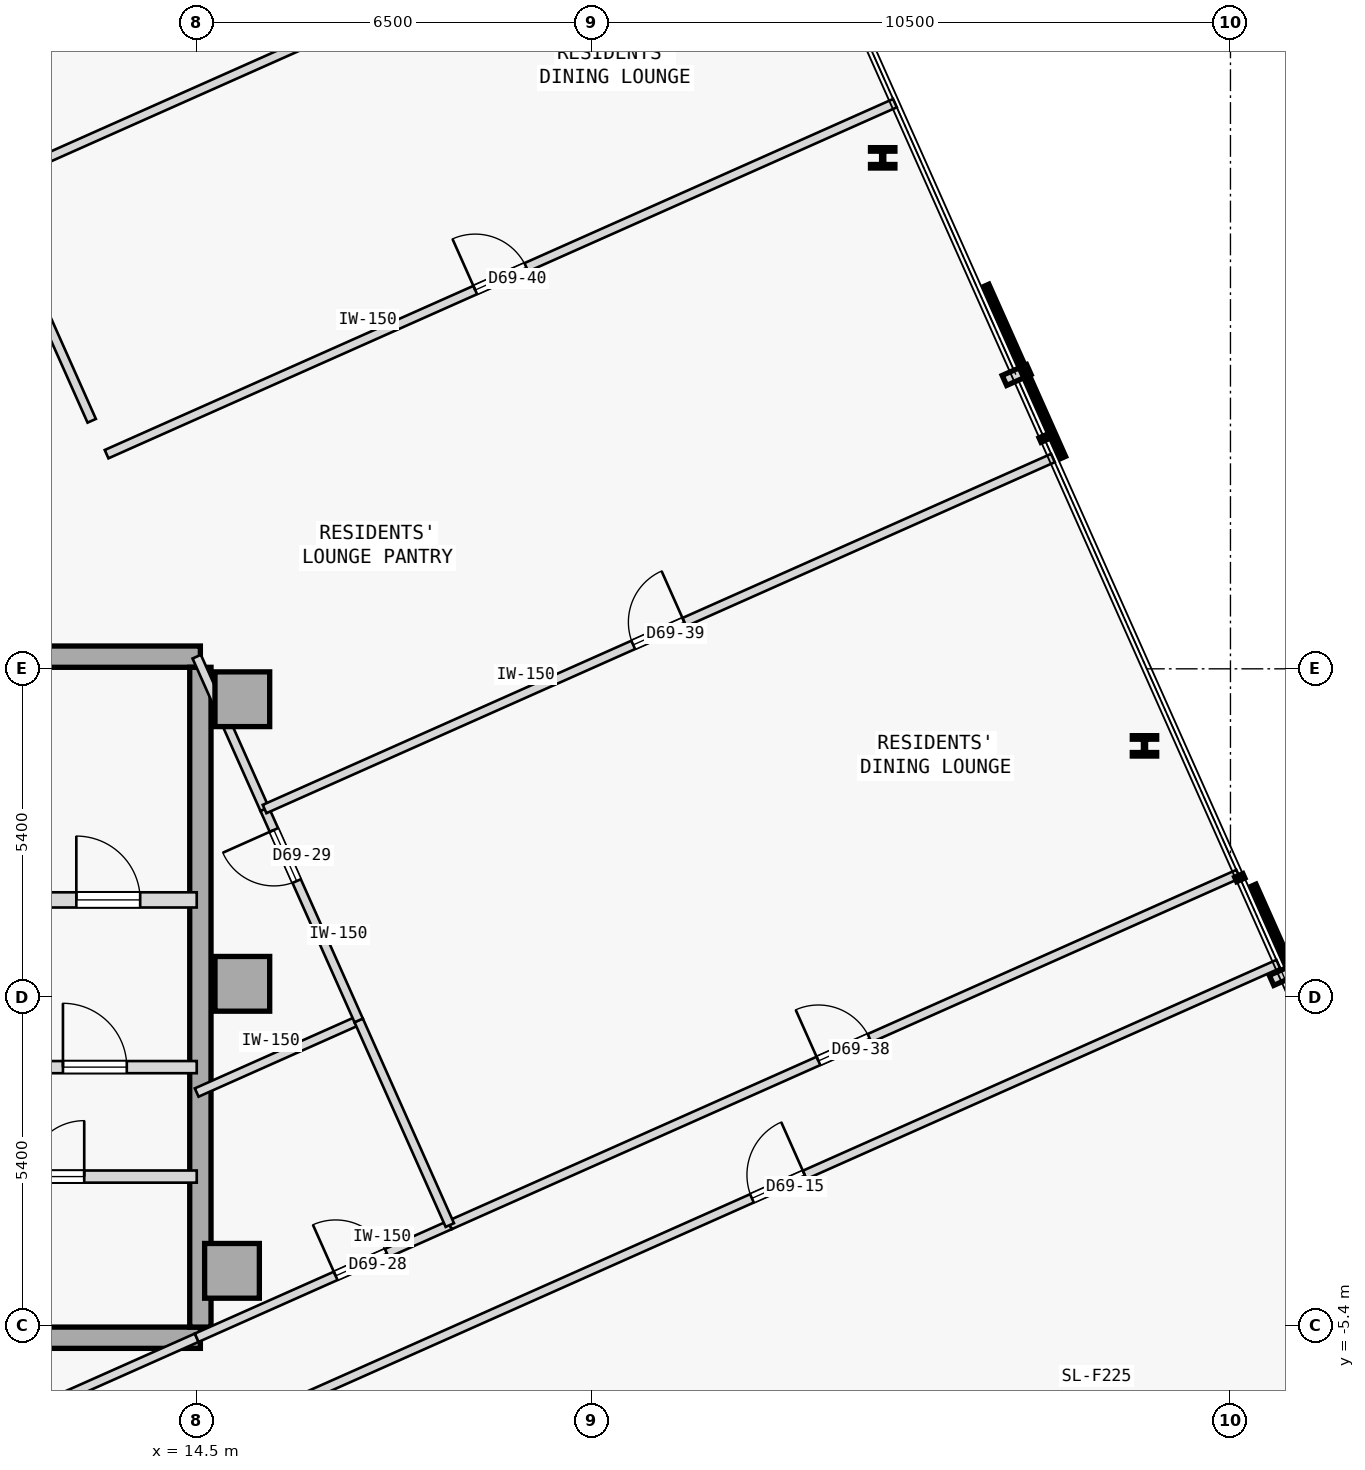
"""IFC4 building model, lengths in metres.
Left out: names, types, materials, properties, quantities, classifications, styles, units other than length and angle.
Written with IfcOpenShell. Run it as: python <this file> out.ifc"""

import sys

from ifc_helpers import new_model, si_unit, direction, frame, frame_2d, origin, origin_2d, place, context, subcontext, project, spatial, rectangle, i_section, extrude, element, fill, save


model = new_model("IFC4")
c1 = context("Model", 3, precision=1e-05, world=origin(), true_north=direction((0.0, 1.0)))
c2 = subcontext(c1, "Body", "Model", "MODEL_VIEW")
j1 = project(units=[si_unit("LENGTHUNIT", "METRE"), si_unit("PLANEANGLEUNIT", "RADIAN")], contexts=[c1])
p1 = place(None, origin())
s1 = spatial("IfcSite", under=j1, at=p1, CompositionType="ELEMENT")
p2 = place(p1, origin())
s2 = spatial("IfcBuilding", under=s1, at=p2, CompositionType="ELEMENT")
p3 = place(p2, frame((0.0, 0.0, 258.85)))
s3 = spatial("IfcBuildingStorey", under=s2, at=p3, CompositionType="ELEMENT", Elevation=258.85)
for number, where, z_axis, x_axis in (
    (1, (15.25, 4.9, 0.0), (0.0, 0.0, 1.0), (1.0, 0.0, 0.0)),
    (2, (15.25, 0.22, 0.0), (0.0, 0.0, 1.0), (1.0, 0.0, 0.0)),
    (3, (15.08, -4.5, 0.0), (0.0, 0.0, 1.0), (1.0, 0.0, 0.0)),
):
    element("IfcColumn", number, at=place(p3, frame(where, z_axis=z_axis, x_axis=x_axis)), inside=s3, PredefinedType="COLUMN", context=c2, shape_type="SweptSolid", body=[
        extrude(rectangle(XDim=0.9, YDim=0.9, at=origin_2d()), origin(), (0.0, 0.0, 1.0), 3.35),
    ])
p4 = place(p3, frame((3.15, 5.6, 0.0), z_axis=(0.0, 0.0, 1.0), x_axis=(1.0, 0.0, 0.0)))
e4 = element("IfcWall", 4, at=p4, inside=s3, PredefinedType="SHEAR", context=c2, shape_type="SweptSolid", body=[
    extrude(rectangle(XDim=11.41, YDim=0.35, at=frame_2d((5.705, 0.0))), origin(), (0.0, 0.0, 1.0), 3.125),
])
p5 = place(p3, frame((3.7, -5.6, 0.0), z_axis=(0.0, 0.0, 1.0), x_axis=(1.0, 0.0, 0.0)))
e5 = element("IfcWall", 5, at=p5, inside=s3, PredefinedType="SHEAR", context=c2, shape_type="SweptSolid", body=[
    extrude(rectangle(XDim=10.86, YDim=0.35, at=frame_2d((5.43, 0.0))), origin(), (0.0, 0.0, 1.0), 3.125),
])
p6 = place(p3, frame((14.56, -5.425, 0.0), z_axis=(0.0, 0.0, 1.0), x_axis=(0.0, 1.0, 0.0)))
e6 = element("IfcWall", 6, at=p6, inside=s3, PredefinedType="SHEAR", context=c2, shape_type="SweptSolid", body=[
    extrude(rectangle(XDim=10.85, YDim=0.35, at=frame_2d((5.425, 0.0))), origin(), (0.0, 0.0, 1.0), 3.125),
])
for number, where, z_axis, x_axis in (
    (7, (30.086, 4.133, 0.0), (0.0, 0.0, 1.0), (1.0, 0.0, 0.0)),
    (8, (25.781, 13.803, 0.0), (0.0, 0.0, 1.0), (1.0, 0.0, 0.0)),
):
    element("IfcColumn", number, at=place(p3, frame(where, z_axis=z_axis, x_axis=x_axis)), inside=s3, PredefinedType="COLUMN", context=c2, shape_type="SweptSolid", body=[
        extrude(i_section(OverallWidth=0.401, OverallDepth=0.335, WebThickness=0.036, FlangeThickness=0.058, FilletRadius=0.015, at=origin_2d()), origin(), (0.0, 0.0, 1.0), 3.35),
    ])
p7 = place(p3, frame((10.9, 1.6, 0.0), z_axis=(0.0, 0.0, 1.0), x_axis=(1.0, 0.0, 0.0)))
e9 = element("IfcWall", 9, at=p7, inside=s3, PredefinedType="STANDARD", context=c2, shape_type="SweptSolid", body=[
    extrude(rectangle(XDim=3.6, YDim=0.25, at=frame_2d((1.8, 0.0))), origin(), (0.0, 0.0, 1.0), 3.125),
])
p8 = place(p7, frame((1.62, 0.0, 0.0)))
e10 = element("IfcOpeningElement", 10, at=p8, cuts=e9, PredefinedType="OPENING", context=c2, shape_type="SweptSolid", body=[
    extrude(rectangle(XDim=1.05, YDim=2.15, at=frame_2d((0.525, 1.075))), frame((0.0, 0.135, 0.0), z_axis=(0.0, -1.0, 0.0), x_axis=(1.0, 0.0, 0.0)), (0.0, 0.0, 1.0), 0.27),
])
p9 = place(p3, frame((11.55, -1.15, 0.0), z_axis=(0.0, 0.0, 1.0), x_axis=(1.0, 0.0, 0.0)))
e11 = element("IfcWall", 11, at=p9, inside=s3, PredefinedType="STANDARD", context=c2, shape_type="SweptSolid", body=[
    extrude(rectangle(XDim=2.95, YDim=0.2, at=frame_2d((1.475, 0.0))), origin(), (0.0, 0.0, 1.0), 3.125),
])
p10 = place(p9, frame((0.75, 0.0, 0.0)))
e12 = element("IfcOpeningElement", 12, at=p10, cuts=e11, PredefinedType="OPENING", context=c2, shape_type="SweptSolid", body=[
    extrude(rectangle(XDim=1.05, YDim=2.18, at=frame_2d((0.525, 1.09))), frame((0.0, 0.11, 0.0), z_axis=(0.0, -1.0, 0.0), x_axis=(1.0, 0.0, 0.0)), (0.0, 0.0, 1.0), 0.22),
])
p11 = place(p3, frame((3.7, -2.95, 0.0), z_axis=(0.0, 0.0, 1.0), x_axis=(1.0, 0.0, 0.0)))
e13 = element("IfcWall", 13, at=p11, inside=s3, PredefinedType="STANDARD", context=c2, shape_type="SweptSolid", body=[
    extrude(rectangle(XDim=10.8, YDim=0.2, at=frame_2d((5.4, 0.0))), origin(), (0.0, 0.0, 1.0), 3.125),
])
p12 = place(p11, frame((0.53, 0.0, 0.0)))
e14 = element("IfcOpeningElement", 14, at=p12, cuts=e13, PredefinedType="OPENING", context=c2, shape_type="SweptSolid", body=[
    extrude(rectangle(XDim=1.1, YDim=2.15, at=frame_2d((0.55, 1.075))), frame((0.0, 0.11, 0.0), z_axis=(0.0, -1.0, 0.0), x_axis=(1.0, 0.0, 0.0)), (0.0, 0.0, 1.0), 0.22),
])
p13 = place(p11, frame((3.71, 0.0, 0.0)))
e15 = element("IfcOpeningElement", 15, at=p13, cuts=e13, PredefinedType="OPENING", context=c2, shape_type="SweptSolid", body=[
    extrude(rectangle(XDim=0.92, YDim=2.15, at=frame_2d((0.46, 1.075))), frame((0.0, 0.11, 0.0), z_axis=(0.0, -1.0, 0.0), x_axis=(1.0, 0.0, 0.0)), (0.0, 0.0, 1.0), 0.22),
])
p14 = place(p11, frame((8.03, 0.0, 0.0)))
e16 = element("IfcOpeningElement", 16, at=p14, cuts=e13, PredefinedType="OPENING", context=c2, shape_type="SweptSolid", body=[
    extrude(rectangle(XDim=0.92, YDim=2.15, at=frame_2d((0.46, 1.075))), frame((0.0, 0.11, 0.0), z_axis=(0.0, -1.0, 0.0), x_axis=(1.0, 0.0, 0.0)), (0.0, 0.0, 1.0), 0.22),
])
p15 = place(p3, frame((15.843, -6.776, 0.0), z_axis=(0.0, 0.0, 1.0), x_axis=(0.913541183414, 0.406746243015, 0.0)))
e17 = element("IfcWall", 17, at=p15, inside=s3, PredefinedType="PARTITIONING", context=c2, shape_type="SweptSolid", body=[
    extrude(rectangle(XDim=17.999, YDim=0.15, at=frame_2d((9.0, 0.0))), origin(), (0.0, 0.0, 1.0), 3.125),
])
p16 = place(p15, frame((8.524, 0.0, 0.0)))
e18 = element("IfcOpeningElement", 18, at=p16, cuts=e17, PredefinedType="OPENING", context=c2, shape_type="SweptSolid", body=[
    extrude(rectangle(XDim=0.95, YDim=2.15, at=frame_2d((0.475, 1.075))), frame((0.0, 0.085, 0.0), z_axis=(0.0, -1.0, 0.0), x_axis=(1.0, 0.0, 0.0)), (0.0, 0.0, 1.0), 0.17),
])
p17 = place(p3, frame((7.588, -8.677, 0.0), z_axis=(0.0, 0.0, 1.0), x_axis=(0.913555880467, 0.406713232221, 0.0)))
e19 = element("IfcWall", 19, at=p17, inside=s3, PredefinedType="PARTITIONING", context=c2, shape_type="SweptSolid", body=[
    extrude(rectangle(XDim=7.566, YDim=0.15, at=frame_2d((3.783, 0.0))), origin(), (0.0, 0.0, 1.0), 3.125),
])
p18 = place(p17, frame((1.205, 0.0, 0.0)))
e20 = element("IfcOpeningElement", 20, at=p18, cuts=e19, PredefinedType="OPENING", context=c2, shape_type="SweptSolid", body=[
    extrude(rectangle(XDim=0.92, YDim=2.15, at=frame_2d((0.46, 1.075))), frame((0.0, 0.085, 0.0), z_axis=(0.0, -1.0, 0.0), x_axis=(1.0, 0.0, 0.0)), (0.0, 0.0, 1.0), 0.17),
])
p19 = place(p3, frame((14.5, -5.6, 0.0), z_axis=(0.0, 0.0, 1.0), x_axis=(0.913550607208, 0.406725076766, 0.0)))
e21 = element("IfcWall", 21, at=p19, inside=s3, PredefinedType="PARTITIONING", context=c2, shape_type="SweptSolid", body=[
    extrude(rectangle(XDim=4.556, YDim=0.15, at=frame_2d((2.278, 0.0))), origin(), (0.0, 0.0, 1.0), 3.125),
])
p20 = place(p19, frame((2.501, 0.0, 0.0)))
e22 = element("IfcOpeningElement", 22, at=p20, cuts=e21, PredefinedType="OPENING", context=c2, shape_type="SweptSolid", body=[
    extrude(rectangle(XDim=0.92, YDim=2.15, at=frame_2d((0.46, 1.075))), frame((0.0, 0.085, 0.0), z_axis=(0.0, -1.0, 0.0), x_axis=(1.0, 0.0, 0.0)), (0.0, 0.0, 1.0), 0.17),
])
p21 = place(p3, frame((18.662, -3.747, 0.0), z_axis=(0.0, 0.0, 1.0), x_axis=(0.913544622417, 0.406738519018, 0.0)))
e23 = element("IfcWall", 23, at=p21, inside=s3, PredefinedType="PARTITIONING", context=c2, shape_type="SweptSolid", body=[
    extrude(rectangle(XDim=14.192, YDim=0.15, at=frame_2d((7.096, 0.0))), origin(), (0.0, 0.0, 1.0), 3.125),
])
p22 = place(p21, frame((6.636, 0.0, 0.0)))
e24 = element("IfcOpeningElement", 24, at=p22, cuts=e23, PredefinedType="OPENING", context=c2, shape_type="SweptSolid", body=[
    extrude(rectangle(XDim=0.92, YDim=2.15, at=frame_2d((0.46, 1.075))), frame((0.0, 0.085, 0.0), z_axis=(0.0, -1.0, 0.0), x_axis=(1.0, 0.0, 0.0)), (0.0, 0.0, 1.0), 0.17),
])
p23 = place(p3, frame((14.5, -1.568, 0.0), z_axis=(0.0, 0.0, 1.0), x_axis=(0.91354204122, 0.4067443164, 0.0)))
e25 = element("IfcWall", 25, at=p23, inside=s3, PredefinedType="PARTITIONING", context=c2, shape_type="SweptSolid", body=[
    extrude(rectangle(XDim=2.916, YDim=0.15, at=frame_2d((1.458, 0.0))), origin(), (0.0, 0.0, 1.0), 3.125),
])
p24 = place(p3, frame((18.662, -3.747, 0.0), z_axis=(0.0, 0.0, 1.0), x_axis=(-0.406740920471, 0.913543553212, 0.0)))
e26 = element("IfcWall", 26, at=p24, inside=s3, PredefinedType="PARTITIONING", context=c2, shape_type="SweptSolid", body=[
    extrude(rectangle(XDim=3.684, YDim=0.15, at=frame_2d((1.842, 0.0))), origin(), (0.0, 0.0, 1.0), 3.125),
])
p25 = place(p3, frame((17.163, -0.382, 0.0), z_axis=(0.0, 0.0, 1.0), x_axis=(-0.406727752939, 0.913549415735, 0.0)))
e27 = element("IfcWall", 27, at=p25, inside=s3, PredefinedType="PARTITIONING", context=c2, shape_type="SweptSolid", body=[
    extrude(rectangle(XDim=3.805, YDim=0.15, at=frame_2d((1.902, 0.0))), origin(), (0.0, 0.0, 1.0), 3.125),
])
p26 = place(p25, frame((2.508, 0.0, 0.0)))
e28 = element("IfcOpeningElement", 28, at=p26, cuts=e27, PredefinedType="OPENING", context=c2, shape_type="SweptSolid", body=[
    extrude(rectangle(XDim=0.92, YDim=2.15, at=frame_2d((0.46, 1.075))), frame((0.0, 0.085, 0.0), z_axis=(0.0, -1.0, 0.0), x_axis=(1.0, 0.0, 0.0)), (0.0, 0.0, 1.0), 0.17),
])
p27 = place(p3, frame((15.616, 3.094, 0.0), z_axis=(0.0, 0.0, 1.0), x_axis=(-0.406782551453, 0.913525016534, 0.0)))
e29 = element("IfcWall", 29, at=p27, inside=s3, PredefinedType="PARTITIONING", context=c2, shape_type="SweptSolid", body=[
    extrude(rectangle(XDim=2.743, YDim=0.15, at=frame_2d((1.372, 0.0))), origin(), (0.0, 0.0, 1.0), 3.125),
])
p28 = place(p3, frame((12.773, 9.479, 0.0), z_axis=(0.0, 0.0, 1.0), x_axis=(-0.406762672331, 0.913533868227, 0.0)))
e30 = element("IfcWall", 30, at=p28, inside=s3, PredefinedType="PARTITIONING", context=c2, shape_type="SweptSolid", body=[
    extrude(rectangle(XDim=4.245, YDim=0.15, at=frame_2d((2.123, 0.0))), origin(), (0.0, 0.0, 1.0), 3.125),
])
p29 = place(p3, frame((15.616, 3.094, 0.0), z_axis=(0.0, 0.0, 1.0), x_axis=(0.913551014388, 0.406724162191, 0.0)))
e31 = element("IfcWall", 31, at=p29, inside=s3, PredefinedType="PARTITIONING", context=c2, shape_type="SweptSolid", body=[
    extrude(rectangle(XDim=14.192, YDim=0.15, at=frame_2d((7.096, 0.0))), origin(), (0.0, 0.0, 1.0), 3.125),
])
p30 = place(p29, frame((6.636, 0.0, 0.0)))
e32 = element("IfcOpeningElement", 32, at=p30, cuts=e31, PredefinedType="OPENING", context=c2, shape_type="SweptSolid", body=[
    extrude(rectangle(XDim=0.92, YDim=2.15, at=frame_2d((0.46, 1.075))), frame((0.0, 0.085, 0.0), z_axis=(0.0, -1.0, 0.0), x_axis=(1.0, 0.0, 0.0)), (0.0, 0.0, 1.0), 0.17),
])
p31 = place(p3, frame((13.018, 8.93, 0.0), z_axis=(0.0, 0.0, 1.0), x_axis=(0.913551014388, 0.406724162191, 0.0)))
e33 = element("IfcWall", 33, at=p31, inside=s3, PredefinedType="PARTITIONING", context=c2, shape_type="SweptSolid", body=[
    extrude(rectangle(XDim=14.192, YDim=0.15, at=frame_2d((7.096, 0.0))), origin(), (0.0, 0.0, 1.0), 3.125),
])
p32 = place(p31, frame((6.636, 0.0, 0.0)))
e34 = element("IfcOpeningElement", 34, at=p32, cuts=e33, PredefinedType="OPENING", context=c2, shape_type="SweptSolid", body=[
    extrude(rectangle(XDim=0.92, YDim=2.15, at=frame_2d((0.46, 1.075))), frame((0.0, 0.085, 0.0), z_axis=(0.0, -1.0, 0.0), x_axis=(1.0, 0.0, 0.0)), (0.0, 0.0, 1.0), 0.17),
])
p33 = place(p3, frame((11.046, 13.357, 0.0), z_axis=(0.0, 0.0, 1.0), x_axis=(0.913553860075, 0.406717770379, 0.0)))
e35 = element("IfcWall", 35, at=p33, inside=s3, PredefinedType="PARTITIONING", context=c2, shape_type="SweptSolid", body=[
    extrude(rectangle(XDim=14.192, YDim=0.15, at=frame_2d((7.096, 0.0))), origin(), (0.0, 0.0, 1.0), 3.125),
])
p34 = place(p8, origin())
e36 = element("IfcDoor", 36, at=p34, inside=s3, OperationType="SINGLE_SWING_LEFT", PredefinedType="DOOR", context=c2, shape_type="SweptSolid", body=[
    extrude(rectangle(XDim=1.05, YDim=2.15, at=frame_2d((0.525, 1.075))), frame((0.0, 0.025, 0.0), z_axis=(0.0, -1.0, 0.0), x_axis=(1.0, 0.0, 0.0)), (0.0, 0.0, 1.0), 0.05),
])
fill(e10, e36)
p35 = place(p10, origin())
e37 = element("IfcDoor", 37, at=p35, inside=s3, OperationType="SINGLE_SWING_LEFT", PredefinedType="DOOR", context=c2, shape_type="SweptSolid", body=[
    extrude(rectangle(XDim=1.05, YDim=2.18, at=frame_2d((0.525, 1.09))), frame((0.0, 0.025, 0.0), z_axis=(0.0, -1.0, 0.0), x_axis=(1.0, 0.0, 0.0)), (0.0, 0.0, 1.0), 0.05),
])
fill(e12, e37)
p36 = place(p14, origin())
e38 = element("IfcDoor", 38, at=p36, inside=s3, OperationType="SINGLE_SWING_RIGHT", PredefinedType="DOOR", context=c2, shape_type="SweptSolid", body=[
    extrude(rectangle(XDim=0.92, YDim=2.15, at=frame_2d((0.46, 1.075))), frame((0.0, 0.025, 0.0), z_axis=(0.0, -1.0, 0.0), x_axis=(1.0, 0.0, 0.0)), (0.0, 0.0, 1.0), 0.05),
])
fill(e16, e38)
p37 = place(p16, origin())
e39 = element("IfcDoor", 39, at=p37, inside=s3, OperationType="SINGLE_SWING_RIGHT", PredefinedType="DOOR", context=c2, shape_type="SweptSolid", body=[
    extrude(rectangle(XDim=0.95, YDim=2.15, at=frame_2d((0.475, 1.075))), frame((0.0, 0.025, 0.0), z_axis=(0.0, -1.0, 0.0), x_axis=(1.0, 0.0, 0.0)), (0.0, 0.0, 1.0), 0.05),
])
fill(e18, e39)
p38 = place(p20, origin())
e40 = element("IfcDoor", 40, at=p38, inside=s3, OperationType="SINGLE_SWING_LEFT", PredefinedType="DOOR", context=c2, shape_type="SweptSolid", body=[
    extrude(rectangle(XDim=0.92, YDim=2.15, at=frame_2d((0.46, 1.075))), frame((0.0, 0.025, 0.0), z_axis=(0.0, -1.0, 0.0), x_axis=(1.0, 0.0, 0.0)), (0.0, 0.0, 1.0), 0.05),
])
fill(e22, e40)
p39 = place(p26, origin())
e41 = element("IfcDoor", 41, at=p39, inside=s3, OperationType="SINGLE_SWING_RIGHT", PredefinedType="DOOR", context=c2, shape_type="SweptSolid", body=[
    extrude(rectangle(XDim=0.92, YDim=2.15, at=frame_2d((0.46, 1.075))), frame((0.0, 0.025, 0.0), z_axis=(0.0, -1.0, 0.0), x_axis=(1.0, 0.0, 0.0)), (0.0, 0.0, 1.0), 0.05),
])
fill(e28, e41)
p40 = place(p22, origin())
e42 = element("IfcDoor", 42, at=p40, inside=s3, OperationType="SINGLE_SWING_LEFT", PredefinedType="DOOR", context=c2, shape_type="SweptSolid", body=[
    extrude(rectangle(XDim=0.92, YDim=2.15, at=frame_2d((0.46, 1.075))), frame((0.0, 0.025, 0.0), z_axis=(0.0, -1.0, 0.0), x_axis=(1.0, 0.0, 0.0)), (0.0, 0.0, 1.0), 0.05),
])
fill(e24, e42)
p41 = place(p30, origin())
e43 = element("IfcDoor", 43, at=p41, inside=s3, OperationType="SINGLE_SWING_RIGHT", PredefinedType="DOOR", context=c2, shape_type="SweptSolid", body=[
    extrude(rectangle(XDim=0.92, YDim=2.15, at=frame_2d((0.46, 1.075))), frame((0.0, 0.025, 0.0), z_axis=(0.0, -1.0, 0.0), x_axis=(1.0, 0.0, 0.0)), (0.0, 0.0, 1.0), 0.05),
])
fill(e32, e43)
p42 = place(p32, origin())
e44 = element("IfcDoor", 44, at=p42, inside=s3, OperationType="SINGLE_SWING_LEFT", PredefinedType="DOOR", context=c2, shape_type="SweptSolid", body=[
    extrude(rectangle(XDim=0.92, YDim=2.15, at=frame_2d((0.46, 1.075))), frame((0.0, 0.025, 0.0), z_axis=(0.0, -1.0, 0.0), x_axis=(1.0, 0.0, 0.0)), (0.0, 0.0, 1.0), 0.05),
])
fill(e34, e44)
save(model, sys.argv[1])
